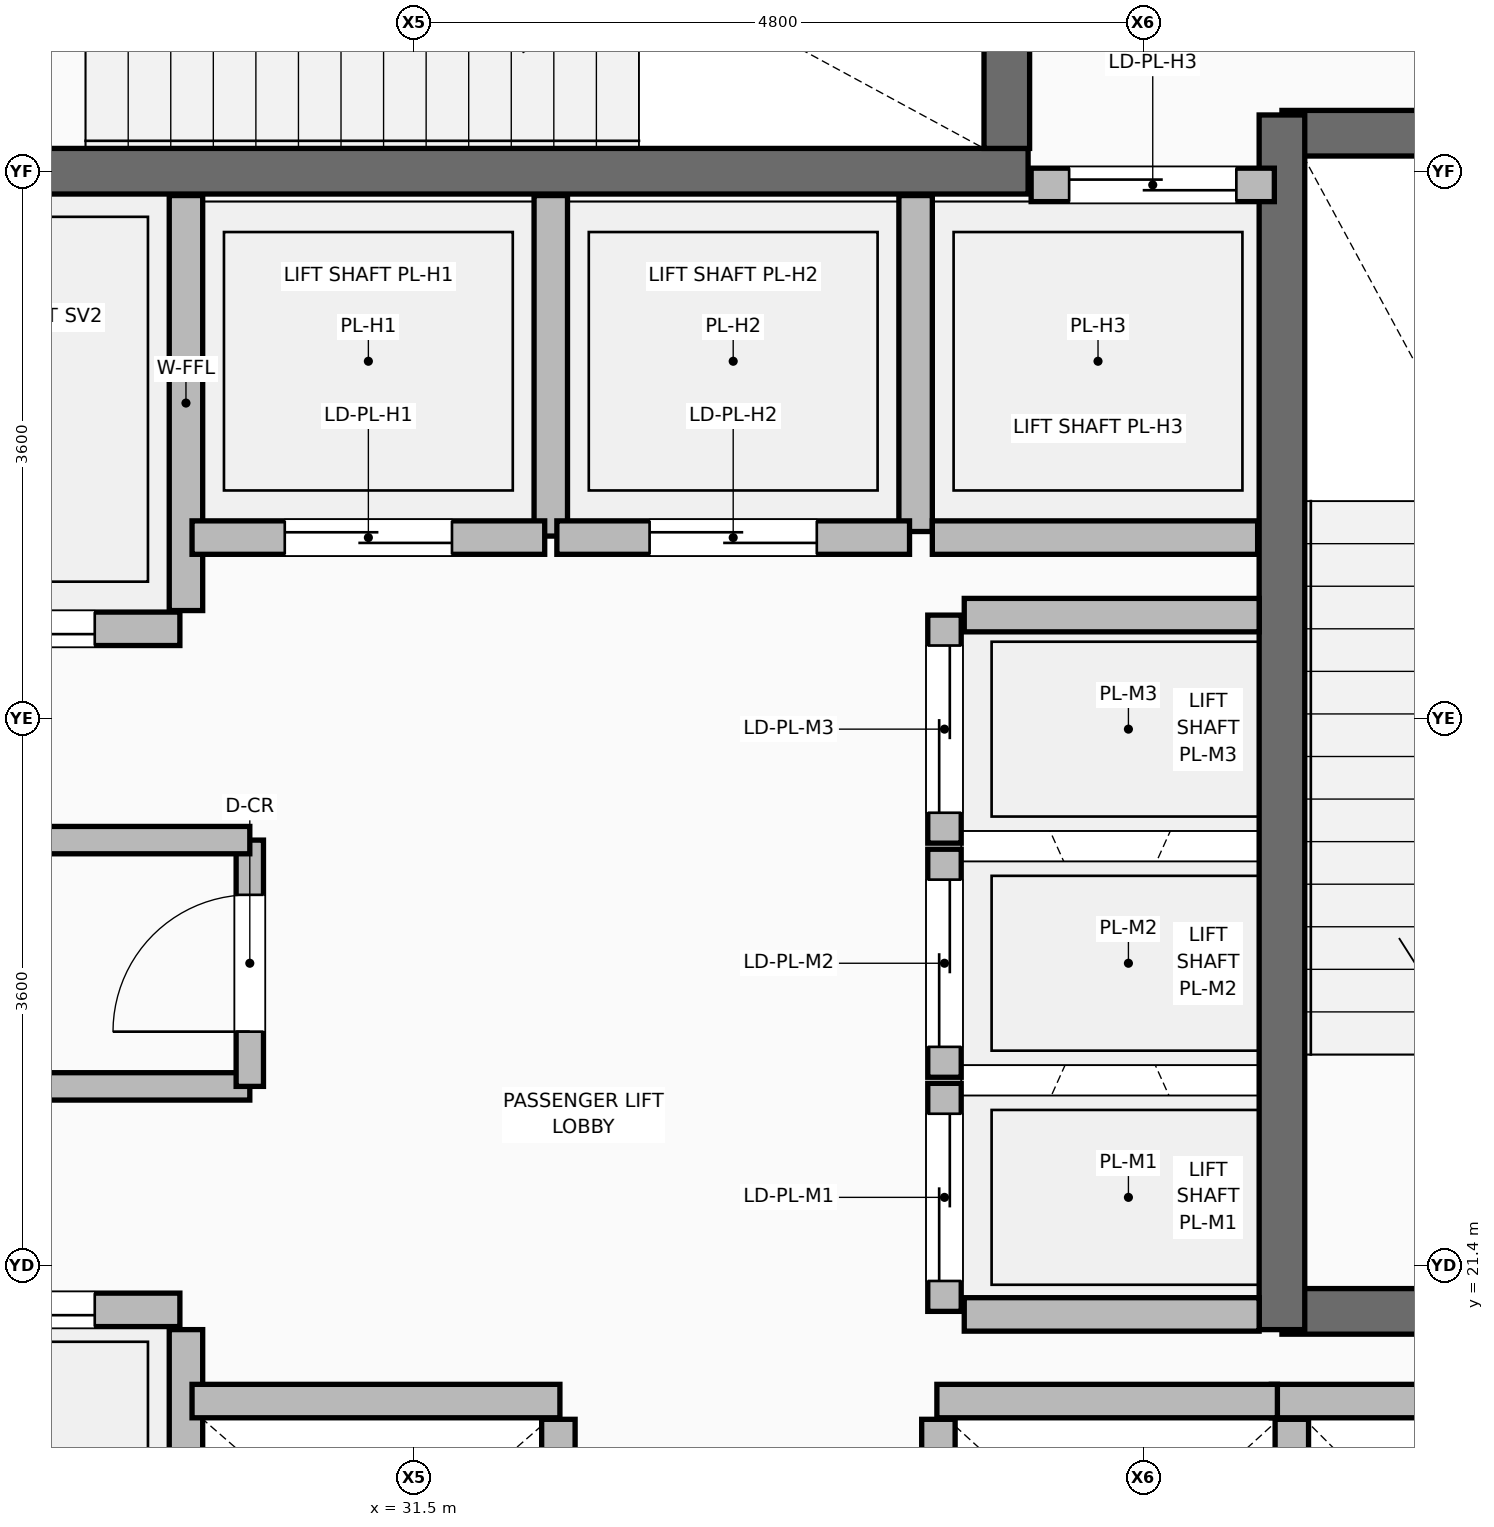
"""IFC4 building model, lengths in metres.
Left out: names, types, materials, properties, quantities, classifications, styles, units other than length and angle.
Written with IfcOpenShell. Run it as: python <this file> out.ifc"""

import sys

from ifc_helpers import new_model, si_unit, direction, frame, frame_2d, origin, place, context, subcontext, project, spatial, rectangle, extrude, element, fill, save


model = new_model("IFC4")
c1 = context("Model", 3, precision=1e-05, world=origin(), true_north=direction((0.0, 1.0)))
c2 = subcontext(c1, "Body", "Model", "MODEL_VIEW")
j1 = project(units=[si_unit("LENGTHUNIT", "METRE"), si_unit("PLANEANGLEUNIT", "RADIAN")], contexts=[c1])
p1 = place(None, origin())
s1 = spatial("IfcSite", under=j1, at=p1, CompositionType="ELEMENT")
p2 = place(p1, origin())
s2 = spatial("IfcBuilding", under=s1, at=p2, CompositionType="ELEMENT")
p3 = place(p2, frame((0.0, 0.0, 181.35)))
s3 = spatial("IfcBuildingStorey", under=s2, at=p3, CompositionType="ELEMENT", Elevation=181.35)
p4 = place(p3, frame((30.0, 18.08, 0.0), z_axis=(0.0, 0.0, 1.0), x_axis=(0.0, 1.0, 0.0)))
e1 = element("IfcWall", 1, at=p4, inside=s3, PredefinedType="PARTITIONING", context=c2, shape_type="SweptSolid", body=[
    extrude(rectangle(XDim=2.9, YDim=0.22, at=frame_2d((1.45, 0.0))), origin(), (0.0, 0.0, 1.0), 4.595),
])
for number, where, z_axis, x_axis in (
    (2, (32.45, 17.92, 0.0), (0.0, 0.0, 1.0), (0.0, 1.0, 0.0)),
    (3, (34.95, 17.92, 0.0), (0.0, 0.0, 1.0), (0.0, 1.0, 0.0)),
):
    element("IfcWall", number, at=place(p3, frame(where, z_axis=z_axis, x_axis=x_axis)), inside=s3, PredefinedType="PARTITIONING", context=c2, shape_type="SweptSolid", body=[
        extrude(rectangle(XDim=2.47, YDim=0.22, at=frame_2d((1.235, 0.0))), origin(), (0.0, 0.0, 1.0), 4.595),
    ])
p5 = place(p3, frame((37.275, 18.08, 0.0), z_axis=(0.0, 0.0, 1.0), x_axis=(0.0, 1.0, 0.0)))
e4 = element("IfcWall", 4, at=p5, inside=s3, PredefinedType="PARTITIONING", context=c2, shape_type="SweptSolid", body=[
    extrude(rectangle(XDim=2.31, YDim=0.22, at=frame_2d((1.155, 0.0))), origin(), (0.0, 0.0, 1.0), 4.595),
])
p6 = place(p3, frame((30.0, 25.71, 0.0), z_axis=(0.0, 0.0, 1.0), x_axis=(0.0, 1.0, 0.0)))
e5 = element("IfcWall", 5, at=p6, inside=s3, PredefinedType="PARTITIONING", context=c2, shape_type="SweptSolid", body=[
    extrude(rectangle(XDim=2.73, YDim=0.22, at=frame_2d((1.365, 0.0))), origin(), (0.0, 0.0, 1.0), 4.595),
])
p7 = place(p3, frame((32.4, 26.2, 0.0), z_axis=(0.0, 0.0, 1.0), x_axis=(0.0, 1.0, 0.0)))
e6 = element("IfcWall", 6, at=p7, inside=s3, PredefinedType="PARTITIONING", context=c2, shape_type="SweptSolid", body=[
    extrude(rectangle(XDim=2.24, YDim=0.22, at=frame_2d((1.12, 0.0))), origin(), (0.0, 0.0, 1.0), 4.595),
])
p8 = place(p3, frame((34.8, 26.23, 0.0), z_axis=(0.0, 0.0, 1.0), x_axis=(0.0, 1.0, 0.0)))
e7 = element("IfcWall", 7, at=p8, inside=s3, PredefinedType="PARTITIONING", context=c2, shape_type="SweptSolid", body=[
    extrude(rectangle(XDim=2.21, YDim=0.22, at=frame_2d((1.105, 0.0))), origin(), (0.0, 0.0, 1.0), 4.595),
])
p9 = place(p3, frame((34.91, 26.19, 0.0), z_axis=(0.0, 0.0, 1.0), x_axis=(1.0, 0.0, 0.0)))
e8 = element("IfcWall", 8, at=p9, inside=s3, PredefinedType="PARTITIONING", context=c2, shape_type="SweptSolid", body=[
    extrude(rectangle(XDim=2.14, YDim=0.22, at=frame_2d((1.07, 0.0))), origin(), (0.0, 0.0, 1.0), 4.595),
])
for number, where, z_axis, x_axis in (
    (9, (37.21, 21.1, 0.0), (0.0, 0.0, 1.0), (1.0, 0.0, 0.0)),
    (10, (37.21, 28.85, 0.0), (0.0, 0.0, 1.0), (1.0, 0.0, 0.0)),
):
    element("IfcWall", number, at=place(p3, frame(where, z_axis=z_axis, x_axis=x_axis)), inside=s3, PredefinedType="SHEAR", context=c2, shape_type="SweptSolid", body=[
        extrude(rectangle(XDim=3.665, YDim=0.3, at=frame_2d((1.833, 0.0))), origin(), (0.0, 0.0, 1.0), 4.62),
    ])
p10 = place(p3, frame((37.21, 20.98, 0.0), z_axis=(0.0, 0.0, 1.0), x_axis=(0.0, 1.0, 0.0)))
e11 = element("IfcWall", 11, at=p10, inside=s3, PredefinedType="SHEAR", context=c2, shape_type="SweptSolid", body=[
    extrude(rectangle(XDim=7.99, YDim=0.3, at=frame_2d((3.995, 0.0))), origin(), (0.0, 0.0, 1.0), 4.62),
])
p11 = place(p3, frame((27.51, 28.6, 0.0), z_axis=(0.0, 0.0, 1.0), x_axis=(1.0, 0.0, 0.0)))
e12 = element("IfcWall", 12, at=p11, inside=s3, PredefinedType="SHEAR", context=c2, shape_type="SweptSolid", body=[
    extrude(rectangle(XDim=8.03, YDim=0.3, at=frame_2d((4.015, 0.0))), origin(), (0.0, 0.0, 1.0), 4.62),
])
p12 = place(p3, frame((35.4, 28.75, 0.0), z_axis=(0.0, 0.0, 1.0), x_axis=(0.0, 1.0, 0.0)))
e13 = element("IfcWall", 13, at=p12, inside=s3, PredefinedType="SHEAR", context=c2, shape_type="SweptSolid", body=[
    extrude(rectangle(XDim=3.475, YDim=0.3, at=frame_2d((1.738, 0.0))), origin(), (0.0, 0.0, 1.0), 4.62),
])
p13 = place(p3, frame((27.74, 21.11, 0.0), z_axis=(0.0, 0.0, 1.0), x_axis=(1.0, 0.0, 0.0)))
e14 = element("IfcWall", 14, at=p13, inside=s3, PredefinedType="PARTITIONING", context=c2, shape_type="SweptSolid", body=[
    extrude(rectangle(XDim=2.22, YDim=0.22, at=frame_2d((1.11, 0.0))), origin(), (0.0, 0.0, 1.0), 4.6),
])
p14 = place(p13, frame((0.56, 0.0, 0.0)))
e15 = element("IfcOpeningElement", 15, at=p14, cuts=e14, PredefinedType="OPENING", context=c2, shape_type="SweptSolid", body=[
    extrude(rectangle(XDim=1.1, YDim=2.2, at=frame_2d((0.55, 1.1))), frame((0.0, 0.12, 0.0), z_axis=(0.0, -1.0, 0.0), x_axis=(1.0, 0.0, 0.0)), (0.0, 0.0, 1.0), 0.24),
])
p15 = place(p3, frame((27.74, 25.59, 0.0), z_axis=(0.0, 0.0, 1.0), x_axis=(1.0, 0.0, 0.0)))
e16 = element("IfcWall", 16, at=p15, inside=s3, PredefinedType="PARTITIONING", context=c2, shape_type="SweptSolid", body=[
    extrude(rectangle(XDim=2.22, YDim=0.22, at=frame_2d((1.11, 0.0))), origin(), (0.0, 0.0, 1.0), 4.6),
])
p16 = place(p15, frame((0.56, 0.0, 0.0)))
e17 = element("IfcOpeningElement", 17, at=p16, cuts=e16, PredefinedType="OPENING", context=c2, shape_type="SweptSolid", body=[
    extrude(rectangle(XDim=1.1, YDim=2.2, at=frame_2d((0.55, 1.1))), frame((0.0, 0.12, 0.0), z_axis=(0.0, -1.0, 0.0), x_axis=(1.0, 0.0, 0.0)), (0.0, 0.0, 1.0), 0.24),
])
p17 = place(p3, frame((30.04, 20.51, 0.0), z_axis=(0.0, 0.0, 1.0), x_axis=(1.0, 0.0, 0.0)))
e18 = element("IfcWall", 18, at=p17, inside=s3, PredefinedType="PARTITIONING", context=c2, shape_type="SweptSolid", body=[
    extrude(rectangle(XDim=2.42, YDim=0.22, at=frame_2d((1.21, 0.0))), origin(), (0.0, 0.0, 1.0), 4.6),
])
for number, where, z_axis, x_axis in (
    (19, (37.14, 20.51, 0.0), (0.0, 0.0, 1.0), (1.0, 0.0, 0.0)),
    (20, (34.94, 20.51, 0.0), (0.0, 0.0, 1.0), (1.0, 0.0, 0.0)),
):
    element("IfcWall", number, at=place(p3, frame(where, z_axis=z_axis, x_axis=x_axis)), inside=s3, PredefinedType="PARTITIONING", context=c2, shape_type="SweptSolid", body=[
        extrude(rectangle(XDim=2.24, YDim=0.22, at=frame_2d((1.12, 0.0))), origin(), (0.0, 0.0, 1.0), 4.6),
    ])
p18 = place(p3, frame((30.04, 26.19, 0.0), z_axis=(0.0, 0.0, 1.0), x_axis=(1.0, 0.0, 0.0)))
e21 = element("IfcWall", 21, at=p18, inside=s3, PredefinedType="PARTITIONING", context=c2, shape_type="SweptSolid", body=[
    extrude(rectangle(XDim=2.32, YDim=0.22, at=frame_2d((1.16, 0.0))), origin(), (0.0, 0.0, 1.0), 4.6),
])
p19 = place(p18, frame((0.61, 0.0, 0.0)))
e22 = element("IfcOpeningElement", 22, at=p19, cuts=e21, PredefinedType="OPENING", context=c2, shape_type="SweptSolid", body=[
    extrude(rectangle(XDim=1.1, YDim=2.2, at=frame_2d((0.55, 1.1))), frame((0.0, 0.12, 0.0), z_axis=(0.0, -1.0, 0.0), x_axis=(1.0, 0.0, 0.0)), (0.0, 0.0, 1.0), 0.24),
])
p20 = place(p3, frame((32.44, 26.19, 0.0), z_axis=(0.0, 0.0, 1.0), x_axis=(1.0, 0.0, 0.0)))
e23 = element("IfcWall", 23, at=p20, inside=s3, PredefinedType="PARTITIONING", context=c2, shape_type="SweptSolid", body=[
    extrude(rectangle(XDim=2.32, YDim=0.22, at=frame_2d((1.16, 0.0))), origin(), (0.0, 0.0, 1.0), 4.6),
])
p21 = place(p20, frame((0.61, 0.0, 0.0)))
e24 = element("IfcOpeningElement", 24, at=p21, cuts=e23, PredefinedType="OPENING", context=c2, shape_type="SweptSolid", body=[
    extrude(rectangle(XDim=1.1, YDim=2.2, at=frame_2d((0.55, 1.1))), frame((0.0, 0.12, 0.0), z_axis=(0.0, -1.0, 0.0), x_axis=(1.0, 0.0, 0.0)), (0.0, 0.0, 1.0), 0.24),
])
p22 = place(p3, frame((35.56, 28.51, 0.0), z_axis=(0.0, 0.0, 1.0), x_axis=(1.0, 0.0, 0.0)))
e25 = element("IfcWall", 25, at=p22, inside=s3, PredefinedType="PARTITIONING", context=c2, shape_type="SweptSolid", body=[
    extrude(rectangle(XDim=1.6, YDim=0.22, at=frame_2d((0.8, 0.0))), origin(), (0.0, 0.0, 1.0), 4.6),
])
p23 = place(p22, frame((0.25, 0.0, 0.0)))
e26 = element("IfcOpeningElement", 26, at=p23, cuts=e25, PredefinedType="OPENING", context=c2, shape_type="SweptSolid", body=[
    extrude(rectangle(XDim=1.1, YDim=2.2, at=frame_2d((0.55, 1.1))), frame((0.0, 0.12, 0.0), z_axis=(0.0, -1.0, 0.0), x_axis=(1.0, 0.0, 0.0)), (0.0, 0.0, 1.0), 0.24),
])
p24 = place(p3, frame((34.99, 21.1, 0.0), z_axis=(0.0, 0.0, 1.0), x_axis=(0.0, 1.0, 0.0)))
e27 = element("IfcWall", 27, at=p24, inside=s3, PredefinedType="PARTITIONING", context=c2, shape_type="SweptSolid", body=[
    extrude(rectangle(XDim=1.5, YDim=0.22, at=frame_2d((0.75, 0.0))), origin(), (0.0, 0.0, 1.0), 4.6),
])
p25 = place(p24, frame((0.2, 0.0, 0.0)))
e28 = element("IfcOpeningElement", 28, at=p25, cuts=e27, PredefinedType="OPENING", context=c2, shape_type="SweptSolid", body=[
    extrude(rectangle(XDim=1.1, YDim=2.2, at=frame_2d((0.55, 1.1))), frame((0.0, 0.12, 0.0), z_axis=(0.0, -1.0, 0.0), x_axis=(1.0, 0.0, 0.0)), (0.0, 0.0, 1.0), 0.24),
])
p26 = place(p3, frame((34.99, 22.64, 0.0), z_axis=(0.0, 0.0, 1.0), x_axis=(0.0, 1.0, 0.0)))
e29 = element("IfcWall", 29, at=p26, inside=s3, PredefinedType="PARTITIONING", context=c2, shape_type="SweptSolid", body=[
    extrude(rectangle(XDim=1.5, YDim=0.22, at=frame_2d((0.75, 0.0))), origin(), (0.0, 0.0, 1.0), 4.6),
])
p27 = place(p26, frame((0.2, 0.0, 0.0)))
e30 = element("IfcOpeningElement", 30, at=p27, cuts=e29, PredefinedType="OPENING", context=c2, shape_type="SweptSolid", body=[
    extrude(rectangle(XDim=1.1, YDim=2.2, at=frame_2d((0.55, 1.1))), frame((0.0, 0.12, 0.0), z_axis=(0.0, -1.0, 0.0), x_axis=(1.0, 0.0, 0.0)), (0.0, 0.0, 1.0), 0.24),
])
p28 = place(p3, frame((34.99, 24.18, 0.0), z_axis=(0.0, 0.0, 1.0), x_axis=(0.0, 1.0, 0.0)))
e31 = element("IfcWall", 31, at=p28, inside=s3, PredefinedType="PARTITIONING", context=c2, shape_type="SweptSolid", body=[
    extrude(rectangle(XDim=1.5, YDim=0.22, at=frame_2d((0.75, 0.0))), origin(), (0.0, 0.0, 1.0), 4.6),
])
p29 = place(p28, frame((0.2, 0.0, 0.0)))
e32 = element("IfcOpeningElement", 32, at=p29, cuts=e31, PredefinedType="OPENING", context=c2, shape_type="SweptSolid", body=[
    extrude(rectangle(XDim=1.1, YDim=2.2, at=frame_2d((0.55, 1.1))), frame((0.0, 0.12, 0.0), z_axis=(0.0, -1.0, 0.0), x_axis=(1.0, 0.0, 0.0)), (0.0, 0.0, 1.0), 0.24),
])
for number, where, z_axis, x_axis in (
    (33, (35.12, 21.08, 0.0), (0.0, 0.0, 1.0), (1.0, 0.0, 0.0)),
    (34, (35.12, 25.68, 0.0), (0.0, 0.0, 1.0), (1.0, 0.0, 0.0)),
):
    element("IfcWall", number, at=place(p3, frame(where, z_axis=z_axis, x_axis=x_axis)), inside=s3, PredefinedType="PARTITIONING", context=c2, shape_type="SweptSolid", body=[
        extrude(rectangle(XDim=1.94, YDim=0.22, at=frame_2d((0.97, 0.0))), origin(), (0.0, 0.0, 1.0), 4.6),
    ])
p30 = place(p3, frame((27.68, 22.58, 0.0), z_axis=(0.0, 0.0, 1.0), x_axis=(1.0, 0.0, 0.0)))
e35 = element("IfcWall", 35, at=p30, inside=s3, PredefinedType="PARTITIONING", context=c2, shape_type="SweptSolid", body=[
    extrude(rectangle(XDim=2.74, YDim=0.18, at=frame_2d((1.37, 0.0))), origin(), (0.0, 0.0, 1.0), 4.6),
])
p31 = place(p3, frame((30.42, 22.58, 0.0), z_axis=(0.0, 0.0, 1.0), x_axis=(0.0, 1.0, 0.0)))
e36 = element("IfcWall", 36, at=p31, inside=s3, PredefinedType="PARTITIONING", context=c2, shape_type="SweptSolid", body=[
    extrude(rectangle(XDim=1.62, YDim=0.18, at=frame_2d((0.81, 0.0))), origin(), (0.0, 0.0, 1.0), 4.6),
])
p32 = place(p31, frame((0.36, 0.0, 0.0)))
e37 = element("IfcOpeningElement", 37, at=p32, cuts=e36, PredefinedType="OPENING", context=c2, shape_type="SweptSolid", body=[
    extrude(rectangle(XDim=0.9, YDim=2.1, at=frame_2d((0.45, 1.05))), frame((0.0, 0.1, 0.0), z_axis=(0.0, -1.0, 0.0), x_axis=(1.0, 0.0, 0.0)), (0.0, 0.0, 1.0), 0.2),
])
p33 = place(p3, frame((27.68, 24.2, 0.0), z_axis=(0.0, 0.0, 1.0), x_axis=(1.0, 0.0, 0.0)))
e38 = element("IfcWall", 38, at=p33, inside=s3, PredefinedType="PARTITIONING", context=c2, shape_type="SweptSolid", body=[
    extrude(rectangle(XDim=2.74, YDim=0.18, at=frame_2d((1.37, 0.0))), origin(), (0.0, 0.0, 1.0), 4.6),
])
p34 = place(p14, origin())
e39 = element("IfcDoor", 39, at=p34, inside=s3, OperationType="DOUBLE_DOOR_SLIDING", PredefinedType="DOOR", context=c2, shape_type="SweptSolid", body=[
    extrude(rectangle(XDim=1.1, YDim=2.2, at=frame_2d((0.55, 1.1))), frame((0.0, 0.025, 0.0), z_axis=(0.0, -1.0, 0.0), x_axis=(1.0, 0.0, 0.0)), (0.0, 0.0, 1.0), 0.05),
])
fill(e15, e39)
p35 = place(p16, frame((1.1, 0.0, 0.0), z_axis=(0.0, 0.0, 1.0), x_axis=(-1.0, 0.0, 0.0)))
e40 = element("IfcDoor", 40, at=p35, inside=s3, OperationType="DOUBLE_DOOR_SLIDING", PredefinedType="DOOR", context=c2, shape_type="SweptSolid", body=[
    extrude(rectangle(XDim=1.1, YDim=2.2, at=frame_2d((0.55, 1.1))), frame((0.0, 0.025, 0.0), z_axis=(0.0, -1.0, 0.0), x_axis=(1.0, 0.0, 0.0)), (0.0, 0.0, 1.0), 0.05),
])
fill(e17, e40)
p36 = place(p19, frame((1.1, 0.0, 0.0), z_axis=(0.0, 0.0, 1.0), x_axis=(-1.0, 0.0, 0.0)))
e41 = element("IfcDoor", 41, at=p36, inside=s3, OperationType="DOUBLE_DOOR_SLIDING", PredefinedType="DOOR", context=c2, shape_type="SweptSolid", body=[
    extrude(rectangle(XDim=1.1, YDim=2.2, at=frame_2d((0.55, 1.1))), frame((0.0, 0.025, 0.0), z_axis=(0.0, -1.0, 0.0), x_axis=(1.0, 0.0, 0.0)), (0.0, 0.0, 1.0), 0.05),
])
fill(e22, e41)
p37 = place(p21, frame((1.1, 0.0, 0.0), z_axis=(0.0, 0.0, 1.0), x_axis=(-1.0, 0.0, 0.0)))
e42 = element("IfcDoor", 42, at=p37, inside=s3, OperationType="DOUBLE_DOOR_SLIDING", PredefinedType="DOOR", context=c2, shape_type="SweptSolid", body=[
    extrude(rectangle(XDim=1.1, YDim=2.2, at=frame_2d((0.55, 1.1))), frame((0.0, 0.025, 0.0), z_axis=(0.0, -1.0, 0.0), x_axis=(1.0, 0.0, 0.0)), (0.0, 0.0, 1.0), 0.05),
])
fill(e24, e42)
p38 = place(p23, origin())
e43 = element("IfcDoor", 43, at=p38, inside=s3, OperationType="DOUBLE_DOOR_SLIDING", PredefinedType="DOOR", context=c2, shape_type="SweptSolid", body=[
    extrude(rectangle(XDim=1.1, YDim=2.2, at=frame_2d((0.55, 1.1))), frame((0.0, 0.025, 0.0), z_axis=(0.0, -1.0, 0.0), x_axis=(1.0, 0.0, 0.0)), (0.0, 0.0, 1.0), 0.05),
])
fill(e26, e43)
p39 = place(p25, origin())
e44 = element("IfcDoor", 44, at=p39, inside=s3, OperationType="DOUBLE_DOOR_SLIDING", PredefinedType="DOOR", context=c2, shape_type="SweptSolid", body=[
    extrude(rectangle(XDim=1.1, YDim=2.2, at=frame_2d((0.55, 1.1))), frame((0.0, 0.025, 0.0), z_axis=(0.0, -1.0, 0.0), x_axis=(1.0, 0.0, 0.0)), (0.0, 0.0, 1.0), 0.05),
])
fill(e28, e44)
p40 = place(p27, origin())
e45 = element("IfcDoor", 45, at=p40, inside=s3, OperationType="DOUBLE_DOOR_SLIDING", PredefinedType="DOOR", context=c2, shape_type="SweptSolid", body=[
    extrude(rectangle(XDim=1.1, YDim=2.2, at=frame_2d((0.55, 1.1))), frame((0.0, 0.025, 0.0), z_axis=(0.0, -1.0, 0.0), x_axis=(1.0, 0.0, 0.0)), (0.0, 0.0, 1.0), 0.05),
])
fill(e30, e45)
p41 = place(p29, origin())
e46 = element("IfcDoor", 46, at=p41, inside=s3, OperationType="DOUBLE_DOOR_SLIDING", PredefinedType="DOOR", context=c2, shape_type="SweptSolid", body=[
    extrude(rectangle(XDim=1.1, YDim=2.2, at=frame_2d((0.55, 1.1))), frame((0.0, 0.025, 0.0), z_axis=(0.0, -1.0, 0.0), x_axis=(1.0, 0.0, 0.0)), (0.0, 0.0, 1.0), 0.05),
])
fill(e32, e46)
p42 = place(p32, origin())
e47 = element("IfcDoor", 47, at=p42, inside=s3, OperationType="SINGLE_SWING_LEFT", PredefinedType="DOOR", context=c2, shape_type="SweptSolid", body=[
    extrude(rectangle(XDim=0.9, YDim=2.1, at=frame_2d((0.45, 1.05))), frame((0.0, 0.025, 0.0), z_axis=(0.0, -1.0, 0.0), x_axis=(1.0, 0.0, 0.0)), (0.0, 0.0, 1.0), 0.05),
])
fill(e37, e47)
save(model, sys.argv[1])
